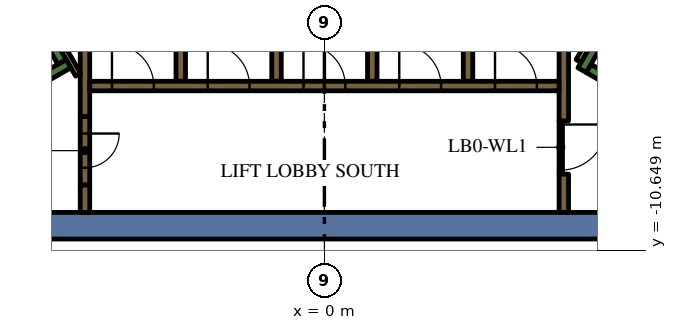
"""IFC4 building model, lengths in metres.
Left out: names, types, materials, properties, quantities, classifications, styles, units other than length and angle.
Written with IfcOpenShell. Run it as: python <this file> out.ifc"""

import sys

from ifc_helpers import new_model, si_unit, direction, frame, frame_2d, origin, place, context, subcontext, project, spatial, rectangle, extrude, element, fill, save


model = new_model("IFC4")
c1 = context("Model", 3, precision=1e-05, world=origin(), true_north=direction((0.0, 1.0)))
c2 = subcontext(c1, "Body", "Model", "MODEL_VIEW")
j1 = project(units=[si_unit("LENGTHUNIT", "METRE"), si_unit("PLANEANGLEUNIT", "RADIAN")], contexts=[c1])
p1 = place(None, origin())
s1 = spatial("IfcSite", under=j1, at=p1, CompositionType="ELEMENT")
p2 = place(p1, origin())
s2 = spatial("IfcBuilding", under=s1, at=p2, CompositionType="ELEMENT")
p3 = place(p2, frame((0.0, 0.0, 201.6)))
s3 = spatial("IfcBuildingStorey", under=s2, at=p3, CompositionType="ELEMENT", Elevation=201.6)
p4 = place(p3, frame((8.904, -10.0, 0.0), z_axis=(0.0, 0.0, 1.0), x_axis=(-1.0, 0.0, 0.0)))
e1 = element("IfcWall", 1, at=p4, inside=s3, PredefinedType="SOLIDWALL", context=c2, shape_type="SweptSolid", body=[
    extrude(rectangle(XDim=22.226, YDim=0.7, at=frame_2d((11.113, 0.0))), origin(), (0.0, 0.0, 1.0), 4.2),
])
p5 = place(p3, frame((12.84, -9.261, 0.0), z_axis=(0.0, 0.0, 1.0), x_axis=(-0.866013990052, 0.500019768644, 0.0)))
e2 = element("IfcWall", 2, at=p5, inside=s3, PredefinedType="SOLIDWALL", context=c2, shape_type="SweptSolid", body=[
    extrude(rectangle(XDim=6.8, YDim=0.25, at=frame_2d((3.4, 0.0))), origin(), (0.0, 0.0, 1.0), 4.2),
])
p6 = place(p3, frame((6.78, -5.906, 0.0), z_axis=(0.0, 0.0, 1.0), x_axis=(0.500223362819, 0.865896406789, 0.0)))
e3 = element("IfcWall", 3, at=p6, inside=s3, PredefinedType="SOLIDWALL", context=c2, shape_type="SweptSolid", body=[
    extrude(rectangle(XDim=0.675, YDim=0.25, at=frame_2d((0.337, 0.0))), origin(), (0.0, 0.0, 1.0), 4.2),
])
p7 = place(p3, frame((-12.84, -9.261, 0.0), z_axis=(0.0, 0.0, 1.0), x_axis=(0.866016039709, 0.500016218704, 0.0)))
e4 = element("IfcWall", 4, at=p7, inside=s3, PredefinedType="SOLIDWALL", context=c2, shape_type="SweptSolid", body=[
    extrude(rectangle(XDim=7.05, YDim=0.25, at=frame_2d((3.525, 0.0))), origin(), (0.0, 0.0, 1.0), 4.2),
])
p8 = place(p3, frame((-6.905, -5.69, 0.0), z_axis=(0.0, 0.0, 1.0), x_axis=(-0.500402024738, 0.865793170242, 0.0)))
e5 = element("IfcWall", 5, at=p8, inside=s3, PredefinedType="SOLIDWALL", context=c2, shape_type="SweptSolid", body=[
    extrude(rectangle(XDim=0.425, YDim=0.25, at=frame_2d((0.212, 0.0))), origin(), (0.0, 0.0, 1.0), 4.2),
])
p9 = place(p3, frame((-6.3, -8.925, 0.0), z_axis=(0.0, 0.0, 1.0), x_axis=(0.0, -1.0, 0.0)))
e6 = element("IfcWall", 6, at=p9, inside=s3, PredefinedType="SOLIDWALL", context=c2, shape_type="SweptSolid", body=[
    extrude(rectangle(XDim=0.725, YDim=0.25, at=frame_2d((0.363, 0.0))), origin(), (0.0, 0.0, 1.0), 4.2),
])
for number, where, z_axis, x_axis in (
    (7, (3.78, -4.0, 0.0), (0.0, 0.0, 1.0), (0.0, -1.0, 0.0)),
    (8, (1.26, -4.0, 0.0), (0.0, 0.0, 1.0), (0.0, -1.0, 0.0)),
    (9, (-1.26, -4.0, 0.0), (0.0, 0.0, 1.0), (0.0, -1.0, 0.0)),
    (10, (-3.78, -4.0, 0.0), (0.0, 0.0, 1.0), (0.0, -1.0, 0.0)),
):
    element("IfcWall", number, at=place(p3, frame(where, z_axis=z_axis, x_axis=x_axis)), inside=s3, PredefinedType="SOLIDWALL", context=c2, shape_type="SweptSolid", body=[
        extrude(rectangle(XDim=2.2, YDim=0.25, at=frame_2d((1.1, 0.0))), origin(), (0.0, 0.0, 1.0), 4.2),
    ])
p10 = place(p3, frame((-6.3, -7.125, 0.0), z_axis=(0.0, 0.0, 1.0), x_axis=(0.0, 1.0, 0.0)))
e11 = element("IfcWall", 11, at=p10, inside=s3, PredefinedType="SOLIDWALL", context=c2, shape_type="SweptSolid", body=[
    extrude(rectangle(XDim=3.375, YDim=0.25, at=frame_2d((1.687, 0.0))), origin(), (0.0, 0.0, 1.0), 4.2),
])
p11 = place(p3, frame((6.3, -7.24, 0.0), z_axis=(0.0, 0.0, 1.0), x_axis=(0.0, 1.0, 0.0)))
e12 = element("IfcWall", 12, at=p11, inside=s3, PredefinedType="SOLIDWALL", context=c2, shape_type="SweptSolid", body=[
    extrude(rectangle(XDim=3.556, YDim=0.25, at=frame_2d((1.778, 0.0))), origin(), (0.0, 0.0, 1.0), 4.2),
])
p12 = place(p3, frame((6.3, -9.65, 0.0), z_axis=(0.0, 0.0, 1.0), x_axis=(0.0, 1.0, 0.0)))
e13 = element("IfcWall", 13, at=p12, inside=s3, PredefinedType="SOLIDWALL", context=c2, shape_type="SweptSolid", body=[
    extrude(rectangle(XDim=1.008, YDim=0.25, at=frame_2d((0.504, 0.0))), origin(), (0.0, 0.0, 1.0), 4.2),
])
p13 = place(p3, frame((-6.48, -6.027, 0.0), z_axis=(0.0, 0.0, 1.0), x_axis=(-0.499927229454, 0.866067413802, 0.0)))
e14 = element("IfcWall", 14, at=p13, inside=s3, PredefinedType="PARTITIONING", context=c2, shape_type="SweptSolid", body=[
    extrude(rectangle(XDim=0.929, YDim=0.15, at=frame_2d((0.464, 0.0))), origin(), (0.0, 0.0, 1.0), 4.2),
])
p14 = place(p3, frame((6.945, -5.222, 0.0), z_axis=(0.0, 0.0, 1.0), x_axis=(-0.499818422106, -0.866130212453, 0.0)))
e15 = element("IfcWall", 15, at=p14, inside=s3, PredefinedType="PARTITIONING", context=c2, shape_type="SweptSolid", body=[
    extrude(rectangle(XDim=0.514, YDim=0.15, at=frame_2d((0.257, 0.0))), origin(), (0.0, 0.0, 1.0), 3.45),
])
p15 = place(p3, frame((-6.175, -6.325, 0.0), z_axis=(0.0, 0.0, 1.0), x_axis=(1.0, 0.0, 0.0)))
e16 = element("IfcWall", 16, at=p15, inside=s3, PredefinedType="SOLIDWALL", context=c2, shape_type="SweptSolid", body=[
    extrude(rectangle(XDim=12.35, YDim=0.25, at=frame_2d((6.175, 0.0))), origin(), (0.0, 0.0, 1.0), 4.2),
])
p16 = place(p15, frame((0.585, 0.0, 0.0)))
e17 = element("IfcOpeningElement", 17, at=p16, cuts=e16, PredefinedType="OPENING", context=c2, shape_type="SweptSolid", body=[
    extrude(rectangle(XDim=1.1, YDim=2.1, at=frame_2d((0.55, 1.05))), frame((0.0, 0.135, 0.0), z_axis=(0.0, -1.0, 0.0), x_axis=(1.0, 0.0, 0.0)), (0.0, 0.0, 1.0), 0.27),
])
p17 = place(p15, frame((3.105, 0.0, 0.0)))
e18 = element("IfcOpeningElement", 18, at=p17, cuts=e16, PredefinedType="OPENING", context=c2, shape_type="SweptSolid", body=[
    extrude(rectangle(XDim=1.1, YDim=2.1, at=frame_2d((0.55, 1.05))), frame((0.0, 0.135, 0.0), z_axis=(0.0, -1.0, 0.0), x_axis=(1.0, 0.0, 0.0)), (0.0, 0.0, 1.0), 0.27),
])
p18 = place(p15, frame((5.625, 0.0, 0.0)))
e19 = element("IfcOpeningElement", 19, at=p18, cuts=e16, PredefinedType="OPENING", context=c2, shape_type="SweptSolid", body=[
    extrude(rectangle(XDim=1.1, YDim=2.1, at=frame_2d((0.55, 1.05))), frame((0.0, 0.135, 0.0), z_axis=(0.0, -1.0, 0.0), x_axis=(1.0, 0.0, 0.0)), (0.0, 0.0, 1.0), 0.27),
])
p19 = place(p15, frame((8.145, 0.0, 0.0)))
e20 = element("IfcOpeningElement", 20, at=p19, cuts=e16, PredefinedType="OPENING", context=c2, shape_type="SweptSolid", body=[
    extrude(rectangle(XDim=1.1, YDim=2.1, at=frame_2d((0.55, 1.05))), frame((0.0, 0.135, 0.0), z_axis=(0.0, -1.0, 0.0), x_axis=(1.0, 0.0, 0.0)), (0.0, 0.0, 1.0), 0.27),
])
p20 = place(p15, frame((10.665, 0.0, 0.0)))
e21 = element("IfcOpeningElement", 21, at=p20, cuts=e16, PredefinedType="OPENING", context=c2, shape_type="SweptSolid", body=[
    extrude(rectangle(XDim=1.1, YDim=2.1, at=frame_2d((0.55, 1.05))), frame((0.0, 0.135, 0.0), z_axis=(0.0, -1.0, 0.0), x_axis=(1.0, 0.0, 0.0)), (0.0, 0.0, 1.0), 0.27),
])
p21 = place(p3, frame((-6.3, -7.125, 0.0), z_axis=(0.0, 0.0, 1.0), x_axis=(0.0, -1.0, 0.0)))
e22 = element("IfcWall", 22, at=p21, inside=s3, PredefinedType="SOLIDWALL", context=c2, shape_type="SweptSolid", body=[
    extrude(rectangle(XDim=1.8, YDim=0.25, at=frame_2d((0.9, 0.0))), origin(), (0.0, 0.0, 1.0), 4.2),
])
p22 = place(p21, frame((0.45, 0.0, 0.0)))
e23 = element("IfcOpeningElement", 23, at=p22, cuts=e22, PredefinedType="OPENING", context=c2, shape_type="SweptSolid", body=[
    extrude(rectangle(XDim=0.9, YDim=2.1, at=frame_2d((0.45, 1.05))), frame((0.0, 0.135, 0.0), z_axis=(0.0, -1.0, 0.0), x_axis=(1.0, 0.0, 0.0)), (0.0, 0.0, 1.0), 0.27),
])
p23 = place(p3, frame((6.22, -7.237, 0.0), z_axis=(0.0, 0.0, 1.0), x_axis=(0.0, -1.0, 0.0)))
e24 = element("IfcWall", 24, at=p23, inside=s3, PredefinedType="PARTITIONING", context=c2, shape_type="SweptSolid", body=[
    extrude(rectangle(XDim=1.4, YDim=0.09, at=frame_2d((0.7, 0.0))), origin(), (0.0, 0.0, 1.0), 3.45),
])
p24 = place(p23, frame((0.1, 0.0, 0.0)))
e25 = element("IfcOpeningElement", 25, at=p24, cuts=e24, PredefinedType="OPENING", context=c2, shape_type="SweptSolid", body=[
    extrude(rectangle(XDim=1.2, YDim=2.1, at=frame_2d((0.6, 1.05))), frame((0.0, 0.055, 0.0), z_axis=(0.0, -1.0, 0.0), x_axis=(1.0, 0.0, 0.0)), (0.0, 0.0, 1.0), 0.11),
])
p25 = place(p16, origin())
e26 = element("IfcDoor", 26, at=p25, inside=s3, OperationType="DOUBLE_DOOR_SLIDING", PredefinedType="DOOR", context=c2, shape_type="SweptSolid", body=[
    extrude(rectangle(XDim=1.1, YDim=2.1, at=frame_2d((0.55, 1.05))), frame((0.0, 0.025, 0.0), z_axis=(0.0, -1.0, 0.0), x_axis=(1.0, 0.0, 0.0)), (0.0, 0.0, 1.0), 0.05),
])
fill(e17, e26)
p26 = place(p17, origin())
e27 = element("IfcDoor", 27, at=p26, inside=s3, OperationType="DOUBLE_DOOR_SLIDING", PredefinedType="DOOR", context=c2, shape_type="SweptSolid", body=[
    extrude(rectangle(XDim=1.1, YDim=2.1, at=frame_2d((0.55, 1.05))), frame((0.0, 0.025, 0.0), z_axis=(0.0, -1.0, 0.0), x_axis=(1.0, 0.0, 0.0)), (0.0, 0.0, 1.0), 0.05),
])
fill(e18, e27)
p27 = place(p18, origin())
e28 = element("IfcDoor", 28, at=p27, inside=s3, OperationType="DOUBLE_DOOR_SLIDING", PredefinedType="DOOR", context=c2, shape_type="SweptSolid", body=[
    extrude(rectangle(XDim=1.1, YDim=2.1, at=frame_2d((0.55, 1.05))), frame((0.0, 0.025, 0.0), z_axis=(0.0, -1.0, 0.0), x_axis=(1.0, 0.0, 0.0)), (0.0, 0.0, 1.0), 0.05),
])
fill(e19, e28)
p28 = place(p19, origin())
e29 = element("IfcDoor", 29, at=p28, inside=s3, OperationType="DOUBLE_DOOR_SLIDING", PredefinedType="DOOR", context=c2, shape_type="SweptSolid", body=[
    extrude(rectangle(XDim=1.1, YDim=2.1, at=frame_2d((0.55, 1.05))), frame((0.0, 0.025, 0.0), z_axis=(0.0, -1.0, 0.0), x_axis=(1.0, 0.0, 0.0)), (0.0, 0.0, 1.0), 0.05),
])
fill(e20, e29)
p29 = place(p20, origin())
e30 = element("IfcDoor", 30, at=p29, inside=s3, OperationType="DOUBLE_DOOR_SLIDING", PredefinedType="DOOR", context=c2, shape_type="SweptSolid", body=[
    extrude(rectangle(XDim=1.1, YDim=2.1, at=frame_2d((0.55, 1.05))), frame((0.0, 0.025, 0.0), z_axis=(0.0, -1.0, 0.0), x_axis=(1.0, 0.0, 0.0)), (0.0, 0.0, 1.0), 0.05),
])
fill(e21, e30)
p30 = place(p22, origin())
e31 = element("IfcDoor", 31, at=p30, inside=s3, OperationType="SINGLE_SWING_LEFT", PredefinedType="DOOR", context=c2, shape_type="SweptSolid", body=[
    extrude(rectangle(XDim=0.9, YDim=2.1, at=frame_2d((0.45, 1.05))), frame((0.0, 0.025, 0.0), z_axis=(0.0, -1.0, 0.0), x_axis=(1.0, 0.0, 0.0)), (0.0, 0.0, 1.0), 0.05),
])
fill(e23, e31)
p31 = place(p24, origin())
e32 = element("IfcDoor", 32, at=p31, inside=s3, OperationType="SINGLE_SWING_LEFT", PredefinedType="DOOR", context=c2, shape_type="SweptSolid", body=[
    extrude(rectangle(XDim=1.2, YDim=2.1, at=frame_2d((0.6, 1.05))), frame((0.0, 0.025, 0.0), z_axis=(0.0, -1.0, 0.0), x_axis=(1.0, 0.0, 0.0)), (0.0, 0.0, 1.0), 0.05),
])
fill(e25, e32)
save(model, sys.argv[1])
